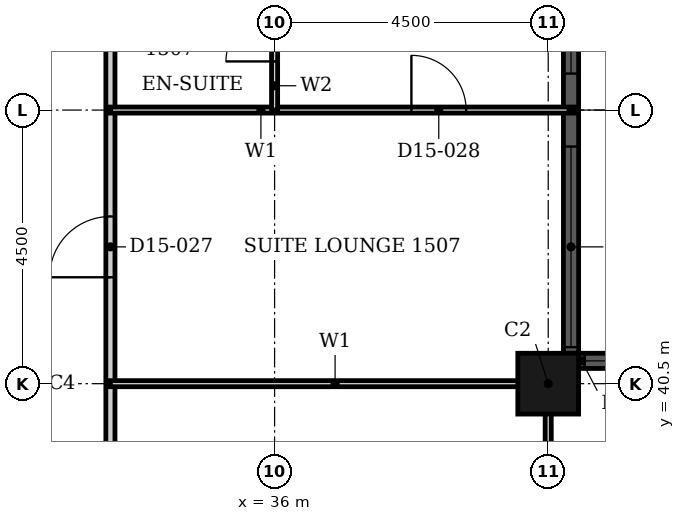
"""IFC4 building model, lengths in metres.
Left out: names, types, materials, properties, quantities, classifications, styles, units other than length and angle.
Written with IfcOpenShell. Run it as: python <this file> out.ifc"""

import sys

from ifc_helpers import new_model, si_unit, direction, frame, frame_2d, origin, origin_2d, place, context, subcontext, project, spatial, rectangle, hollow_rectangle, extrude, element, fill, save


model = new_model("IFC4")
c1 = context("Model", 3, precision=1e-05, world=origin(), true_north=direction((0.0, 1.0)))
c2 = subcontext(c1, "Body", "Model", "MODEL_VIEW")
j1 = project(units=[si_unit("LENGTHUNIT", "METRE"), si_unit("PLANEANGLEUNIT", "RADIAN")], contexts=[c1])
p1 = place(None, origin())
s1 = spatial("IfcSite", under=j1, at=p1, CompositionType="ELEMENT")
p2 = place(p1, origin())
s2 = spatial("IfcBuilding", under=s1, at=p2, CompositionType="ELEMENT")
p3 = place(p2, frame((0.0, 0.0, 67.2)))
s3 = spatial("IfcBuildingStorey", under=s2, at=p3, CompositionType="ELEMENT", Elevation=67.2)
p4 = place(p3, frame((40.5, 40.5, 0.0), z_axis=(0.0, 0.0, 1.0), x_axis=(1.0, 0.0, 0.0)))
e1 = element("IfcColumn", 1, at=p4, inside=s3, PredefinedType="COLUMN", context=c2, shape_type="SweptSolid", body=[
    extrude(hollow_rectangle(XDim=1.0, YDim=1.0, WallThickness=0.032, at=origin_2d()), origin(), (0.0, 0.0, 1.0), 3.6),
])
p5 = place(p3, frame((44.5, 40.875, 0.0), z_axis=(0.0, 0.0, 1.0), x_axis=(-1.0, 0.0, 0.0)))
e2 = element("IfcWall", 2, at=p5, inside=s3, PredefinedType="SOLIDWALL", context=c2, shape_type="SweptSolid", body=[
    extrude(rectangle(XDim=3.5, YDim=0.25, at=frame_2d((1.75, 0.0))), origin(), (0.0, 0.0, 1.0), 3.6),
])
p6 = place(p5, frame((0.1, 0.0, 0.9)))
e3 = element("IfcOpeningElement", 3, at=p6, cuts=e2, PredefinedType="OPENING", context=c2, shape_type="SweptSolid", body=[
    extrude(rectangle(XDim=3.3, YDim=2.08, at=frame_2d((1.65, 1.04))), frame((0.0, 0.135, 0.0), z_axis=(0.0, -1.0, 0.0), x_axis=(1.0, 0.0, 0.0)), (0.0, 0.0, 1.0), 0.27),
])
p7 = place(p3, frame((40.875, 41.0, 0.0), z_axis=(0.0, 0.0, 1.0), x_axis=(0.0, 1.0, 0.0)))
e4 = element("IfcWall", 4, at=p7, inside=s3, PredefinedType="SOLIDWALL", context=c2, shape_type="SweptSolid", body=[
    extrude(rectangle(XDim=8.0, YDim=0.25, at=frame_2d((4.0, 0.0))), origin(), (0.0, 0.0, 1.0), 3.6),
])
p8 = place(p7, frame((0.1, 0.0, 0.9)))
e5 = element("IfcOpeningElement", 5, at=p8, cuts=e4, PredefinedType="OPENING", context=c2, shape_type="SweptSolid", body=[
    extrude(rectangle(XDim=3.3, YDim=2.08, at=frame_2d((1.65, 1.04))), frame((0.0, 0.135, 0.0), z_axis=(0.0, -1.0, 0.0), x_axis=(1.0, 0.0, 0.0)), (0.0, 0.0, 1.0), 0.27),
])
p9 = place(p7, frame((4.6, 0.0, 0.9)))
e6 = element("IfcOpeningElement", 6, at=p9, cuts=e4, PredefinedType="OPENING", context=c2, shape_type="SweptSolid", body=[
    extrude(rectangle(XDim=3.3, YDim=2.08, at=frame_2d((1.65, 1.04))), frame((0.0, 0.135, 0.0), z_axis=(0.0, -1.0, 0.0), x_axis=(1.0, 0.0, 0.0)), (0.0, 0.0, 1.0), 0.27),
])
p10 = place(p3, frame((33.3, 33.3, 0.0), z_axis=(0.0, 0.0, 1.0), x_axis=(0.0, 1.0, 0.0)))
e7 = element("IfcWall", 7, at=p10, inside=s3, PredefinedType="PARTITIONING", context=c2, shape_type="SweptSolid", body=[
    extrude(rectangle(XDim=16.2, YDim=0.15, at=frame_2d((8.1, 0.0))), origin(), (0.0, 0.0, 1.0), 3.3),
])
p11 = place(p10, frame((8.95, 0.0, 0.0)))
e8 = element("IfcOpeningElement", 8, at=p11, cuts=e7, PredefinedType="OPENING", context=c2, shape_type="SweptSolid", body=[
    extrude(rectangle(XDim=1.0, YDim=2.1, at=frame_2d((0.5, 1.05))), frame((0.0, 0.085, 0.0), z_axis=(0.0, -1.0, 0.0), x_axis=(1.0, 0.0, 0.0)), (0.0, 0.0, 1.0), 0.17),
])
p12 = place(p3, frame((33.3, 40.5, 0.0), z_axis=(0.0, 0.0, 1.0), x_axis=(1.0, 0.0, 0.0)))
e9 = element("IfcWall", 9, at=p12, inside=s3, PredefinedType="PARTITIONING", context=c2, shape_type="SweptSolid", body=[
    extrude(rectangle(XDim=7.39, YDim=0.1, at=frame_2d((3.695, 0.0))), origin(), (0.0, 0.0, 1.0), 2.38),
])
p13 = place(p3, frame((33.3, 45.0, 0.0), z_axis=(0.0, 0.0, 1.0), x_axis=(1.0, 0.0, 0.0)))
e10 = element("IfcWall", 10, at=p13, inside=s3, PredefinedType="PARTITIONING", context=c2, shape_type="SweptSolid", body=[
    extrude(rectangle(XDim=7.64, YDim=0.1, at=frame_2d((3.82, 0.0))), origin(), (0.0, 0.0, 1.0), 3.3),
])
p14 = place(p13, frame((4.95, 0.0, 0.0)))
e11 = element("IfcOpeningElement", 11, at=p14, cuts=e10, PredefinedType="OPENING", context=c2, shape_type="SweptSolid", body=[
    extrude(rectangle(XDim=0.9, YDim=2.1, at=frame_2d((0.45, 1.05))), frame((0.0, 0.06, 0.0), z_axis=(0.0, -1.0, 0.0), x_axis=(1.0, 0.0, 0.0)), (0.0, 0.0, 1.0), 0.12),
])
p15 = place(p3, frame((40.5, 33.3, 0.0), z_axis=(0.0, 0.0, 1.0), x_axis=(0.0, 1.0, 0.0)))
e12 = element("IfcWall", 12, at=p15, inside=s3, PredefinedType="PARTITIONING", context=c2, shape_type="SweptSolid", body=[
    extrude(rectangle(XDim=7.39, YDim=0.1, at=frame_2d((3.695, 0.0))), origin(), (0.0, 0.0, 1.0), 3.3),
])
p16 = place(p3, frame((36.0, 45.0, 0.0), z_axis=(0.0, 0.0, 1.0), x_axis=(0.0, 1.0, 0.0)))
e13 = element("IfcWall", 13, at=p16, inside=s3, PredefinedType="PARTITIONING", context=c2, shape_type="SweptSolid", body=[
    extrude(rectangle(XDim=2.4, YDim=0.1, at=frame_2d((1.2, 0.0))), origin(), (0.0, 0.0, 1.0), 2.58),
])
p17 = place(p16, frame((0.8, 0.0, 0.0)))
e14 = element("IfcOpeningElement", 14, at=p17, cuts=e13, PredefinedType="OPENING", context=c2, shape_type="SweptSolid", body=[
    extrude(rectangle(XDim=0.8, YDim=2.1, at=frame_2d((0.4, 1.05))), frame((0.0, 0.06, 0.0), z_axis=(0.0, -1.0, 0.0), x_axis=(1.0, 0.0, 0.0)), (0.0, 0.0, 1.0), 0.12),
])
p18 = place(p6, origin())
e15 = element("IfcWindow", 15, at=p18, inside=s3, PartitioningType="SINGLE_PANEL", PredefinedType="WINDOW", context=c2, shape_type="SweptSolid", body=[
    extrude(rectangle(XDim=3.3, YDim=2.08, at=frame_2d((1.65, 1.04))), frame((0.0, 0.03, 0.0), z_axis=(0.0, -1.0, 0.0), x_axis=(1.0, 0.0, 0.0)), (0.0, 0.0, 1.0), 0.06),
])
fill(e3, e15)
p19 = place(p8, origin())
e16 = element("IfcWindow", 16, at=p19, inside=s3, PartitioningType="SINGLE_PANEL", PredefinedType="WINDOW", context=c2, shape_type="SweptSolid", body=[
    extrude(rectangle(XDim=3.3, YDim=2.08, at=frame_2d((1.65, 1.04))), frame((0.0, 0.03, 0.0), z_axis=(0.0, -1.0, 0.0), x_axis=(1.0, 0.0, 0.0)), (0.0, 0.0, 1.0), 0.06),
])
fill(e5, e16)
p20 = place(p9, origin())
e17 = element("IfcWindow", 17, at=p20, inside=s3, PartitioningType="SINGLE_PANEL", PredefinedType="WINDOW", context=c2, shape_type="SweptSolid", body=[
    extrude(rectangle(XDim=3.3, YDim=2.08, at=frame_2d((1.65, 1.04))), frame((0.0, 0.03, 0.0), z_axis=(0.0, -1.0, 0.0), x_axis=(1.0, 0.0, 0.0)), (0.0, 0.0, 1.0), 0.06),
])
fill(e6, e17)
p21 = place(p11, origin())
e18 = element("IfcDoor", 18, at=p21, inside=s3, OperationType="SINGLE_SWING_LEFT", PredefinedType="DOOR", context=c2, shape_type="SweptSolid", body=[
    extrude(rectangle(XDim=1.0, YDim=2.1, at=frame_2d((0.5, 1.05))), frame((0.0, 0.025, 0.0), z_axis=(0.0, -1.0, 0.0), x_axis=(1.0, 0.0, 0.0)), (0.0, 0.0, 1.0), 0.05),
])
fill(e8, e18)
p22 = place(p14, origin())
e19 = element("IfcDoor", 19, at=p22, inside=s3, OperationType="SINGLE_SWING_RIGHT", PredefinedType="DOOR", context=c2, shape_type="SweptSolid", body=[
    extrude(rectangle(XDim=0.9, YDim=2.1, at=frame_2d((0.45, 1.05))), frame((0.0, 0.025, 0.0), z_axis=(0.0, -1.0, 0.0), x_axis=(1.0, 0.0, 0.0)), (0.0, 0.0, 1.0), 0.05),
])
fill(e11, e19)
p23 = place(p17, origin())
e20 = element("IfcDoor", 20, at=p23, inside=s3, OperationType="SINGLE_SWING_RIGHT", PredefinedType="DOOR", context=c2, shape_type="SweptSolid", body=[
    extrude(rectangle(XDim=0.8, YDim=2.1, at=frame_2d((0.4, 1.05))), frame((0.0, 0.025, 0.0), z_axis=(0.0, -1.0, 0.0), x_axis=(1.0, 0.0, 0.0)), (0.0, 0.0, 1.0), 0.05),
])
fill(e14, e20)
save(model, sys.argv[1])
